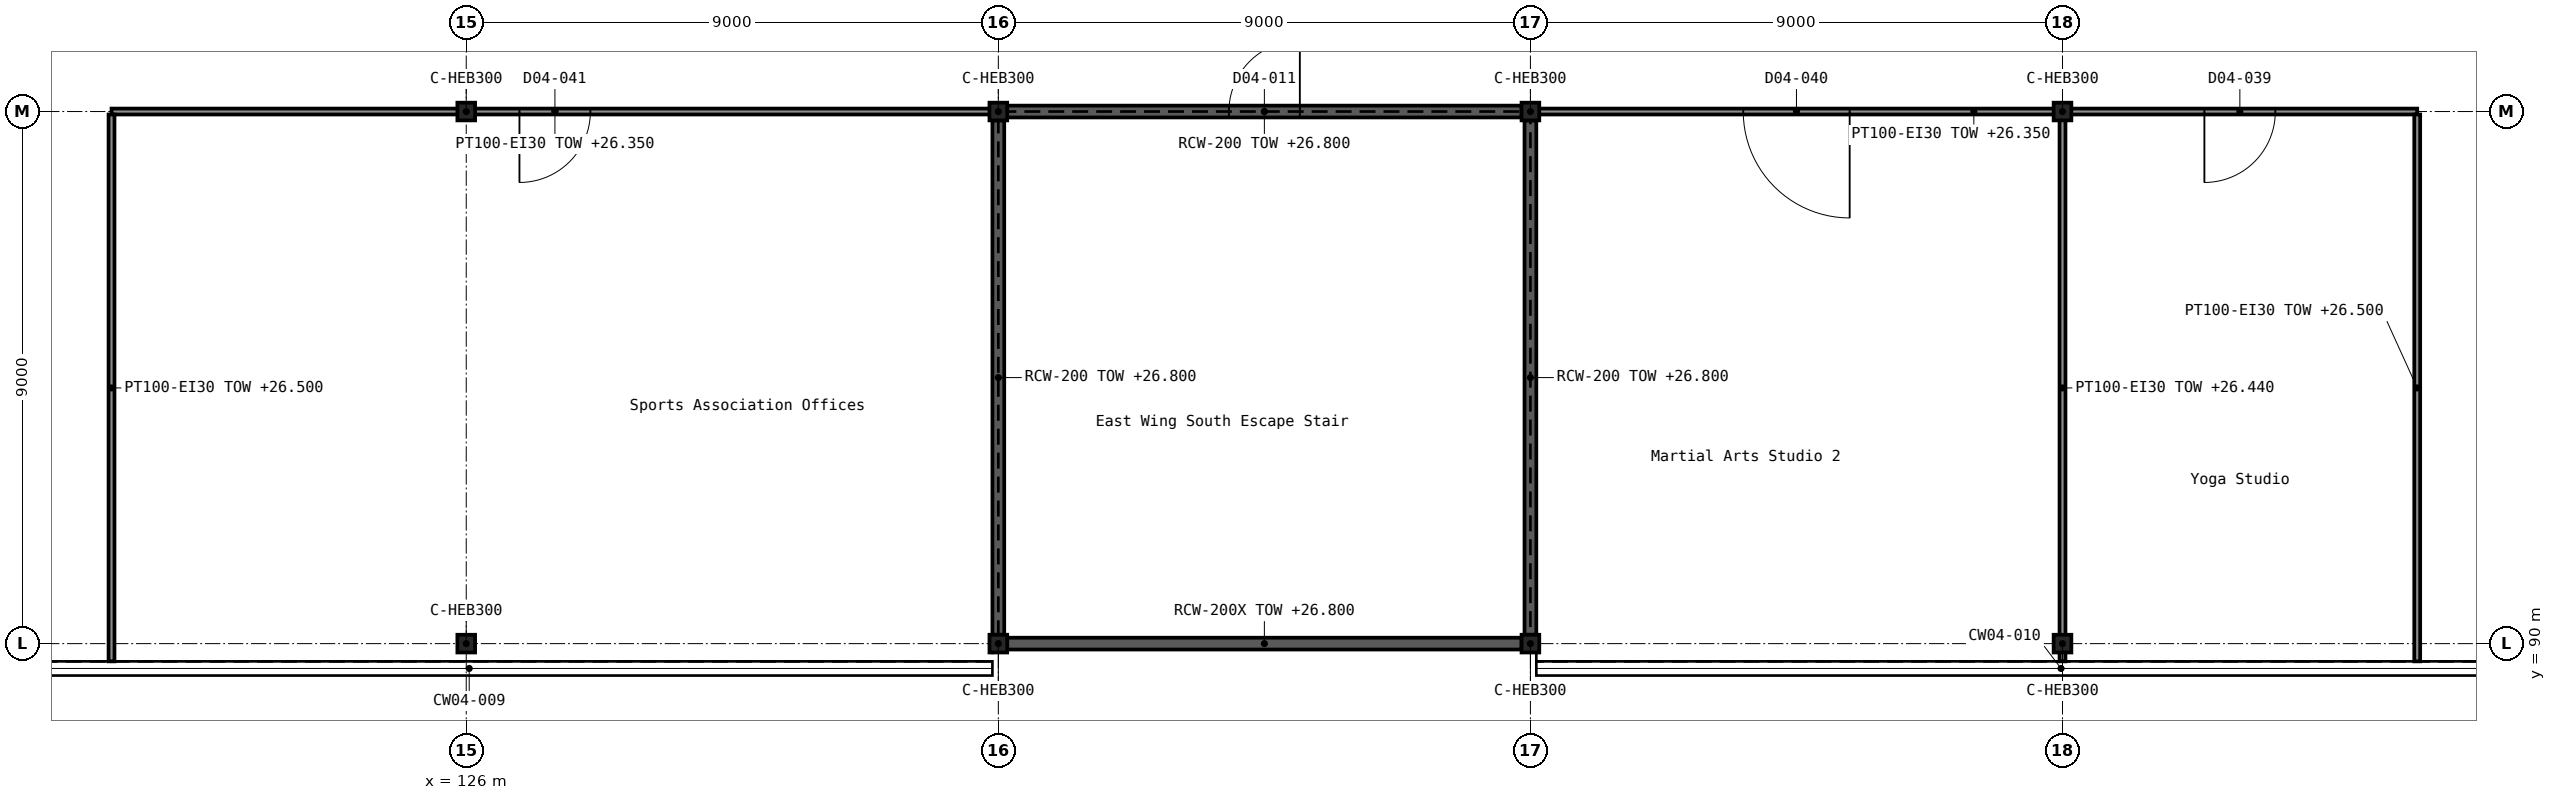
"""IFC4 building model, lengths in metres.
Left out: names, types, materials, properties, quantities, classifications, styles, units other than length and angle.
Written with IfcOpenShell. Run it as: python <this file> out.ifc"""

import sys

from ifc_helpers import new_model, si_unit, direction, frame, frame_2d, origin, origin_2d, place, context, subcontext, project, spatial, rectangle, i_section, extrude, element, fill, save


model = new_model("IFC4")
c1 = context("Model", 3, precision=1e-05, world=origin(), true_north=direction((0.0, 1.0)))
c2 = subcontext(c1, "Body", "Model", "MODEL_VIEW")
j1 = project(units=[si_unit("LENGTHUNIT", "METRE"), si_unit("PLANEANGLEUNIT", "RADIAN")], contexts=[c1])
p1 = place(None, origin())
s1 = spatial("IfcSite", under=j1, at=p1, CompositionType="ELEMENT")
p2 = place(p1, origin())
s2 = spatial("IfcBuilding", under=s1, at=p2, CompositionType="ELEMENT")
p3 = place(p2, frame((0.0, 0.0, 21.6)))
s3 = spatial("IfcBuildingStorey", under=s2, at=p3, CompositionType="ELEMENT", Elevation=21.6)
for number, where, z_axis, x_axis in (
    (1, (126.0, 90.0, 0.0), (0.0, 0.0, 1.0), (1.0, 0.0, 0.0)),
    (2, (135.0, 90.0, 0.0), (0.0, 0.0, 1.0), (1.0, 0.0, 0.0)),
    (3, (144.0, 90.0, 0.0), (0.0, 0.0, 1.0), (1.0, 0.0, 0.0)),
    (4, (153.0, 90.0, 0.0), (0.0, 0.0, 1.0), (1.0, 0.0, 0.0)),
    (5, (126.0, 99.0, 0.0), (0.0, 0.0, 1.0), (1.0, 0.0, 0.0)),
    (6, (135.0, 99.0, 0.0), (0.0, 0.0, 1.0), (1.0, 0.0, 0.0)),
    (7, (144.0, 99.0, 0.0), (0.0, 0.0, 1.0), (1.0, 0.0, 0.0)),
    (8, (153.0, 99.0, 0.0), (0.0, 0.0, 1.0), (1.0, 0.0, 0.0)),
):
    element("IfcColumn", number, at=place(p3, frame(where, z_axis=z_axis, x_axis=x_axis)), inside=s3, PredefinedType="COLUMN", context=c2, shape_type="SweptSolid", body=[
        extrude(i_section(OverallWidth=0.3, OverallDepth=0.3, WebThickness=0.011, FlangeThickness=0.019, FilletRadius=0.027, at=origin_2d()), origin(), (0.0, 0.0, 1.0), 5.4),
    ])
p4 = place(p3, frame((135.15, 90.0, 0.0), z_axis=(0.0, 0.0, 1.0), x_axis=(1.0, 0.0, 0.0)))
e9 = element("IfcWall", 9, at=p4, inside=s3, PredefinedType="SHEAR", context=c2, shape_type="SweptSolid", body=[
    extrude(rectangle(XDim=8.7, YDim=0.2, at=frame_2d((4.35, 0.0))), origin(), (0.0, 0.0, 1.0), 5.2),
])
p5 = place(p3, frame((135.15, 99.0, 0.0), z_axis=(0.0, 0.0, 1.0), x_axis=(1.0, 0.0, 0.0)))
e10 = element("IfcWall", 10, at=p5, inside=s3, PredefinedType="SHEAR", context=c2, shape_type="SweptSolid", body=[
    extrude(rectangle(XDim=8.7, YDim=0.2, at=frame_2d((4.35, 0.0))), origin(), (0.0, 0.0, 1.0), 5.2),
])
p6 = place(p5, frame((3.75, 0.0, 0.0)))
e11 = element("IfcOpeningElement", 11, at=p6, cuts=e10, PredefinedType="OPENING", context=c2, shape_type="SweptSolid", body=[
    extrude(rectangle(XDim=1.2, YDim=2.1, at=frame_2d((0.6, 1.05))), frame((0.0, 0.111, 0.0), z_axis=(0.0, -1.0, 0.0), x_axis=(1.0, 0.0, 0.0)), (0.0, 0.0, 1.0), 0.222),
])
for number, where, z_axis, x_axis in (
    (12, (135.0, 90.15, 0.0), (0.0, 0.0, 1.0), (0.0, 1.0, 0.0)),
    (13, (144.0, 90.15, 0.0), (0.0, 0.0, 1.0), (0.0, 1.0, 0.0)),
):
    element("IfcWall", number, at=place(p3, frame(where, z_axis=z_axis, x_axis=x_axis)), inside=s3, PredefinedType="SHEAR", context=c2, shape_type="SweptSolid", body=[
        extrude(rectangle(XDim=8.7, YDim=0.2, at=frame_2d((4.35, 0.0))), origin(), (0.0, 0.0, 1.0), 5.2),
    ])
p7 = place(p3, frame((120.0, 99.0, 0.0), z_axis=(0.0, 0.0, 1.0), x_axis=(1.0, 0.0, 0.0)))
e14 = element("IfcWall", 14, at=p7, inside=s3, PredefinedType="PARTITIONING", context=c2, shape_type="SweptSolid", body=[
    extrude(rectangle(XDim=15.0, YDim=0.1, at=frame_2d((7.5, 0.0))), origin(), (0.0, 0.0, 1.0), 4.75),
])
p8 = place(p7, frame((6.9, 0.0, 0.0)))
e15 = element("IfcOpeningElement", 15, at=p8, cuts=e14, PredefinedType="OPENING", context=c2, shape_type="SweptSolid", body=[
    extrude(rectangle(XDim=1.2, YDim=2.1, at=frame_2d((0.6, 1.05))), frame((0.0, 0.061, 0.0), z_axis=(0.0, -1.0, 0.0), x_axis=(1.0, 0.0, 0.0)), (0.0, 0.0, 1.0), 0.122),
])
p9 = place(p3, frame((144.0, 99.0, 0.0), z_axis=(0.0, 0.0, 1.0), x_axis=(1.0, 0.0, 0.0)))
e16 = element("IfcWall", 16, at=p9, inside=s3, PredefinedType="PARTITIONING", context=c2, shape_type="SweptSolid", body=[
    extrude(rectangle(XDim=15.0, YDim=0.1, at=frame_2d((7.5, 0.0))), origin(), (0.0, 0.0, 1.0), 4.75),
])
p10 = place(p9, frame((11.4, 0.0, 0.0)))
e17 = element("IfcOpeningElement", 17, at=p10, cuts=e16, PredefinedType="OPENING", context=c2, shape_type="SweptSolid", body=[
    extrude(rectangle(XDim=1.2, YDim=2.1, at=frame_2d((0.6, 1.05))), frame((0.0, 0.061, 0.0), z_axis=(0.0, -1.0, 0.0), x_axis=(1.0, 0.0, 0.0)), (0.0, 0.0, 1.0), 0.122),
])
p11 = place(p9, frame((3.6, 0.0, 0.0)))
e18 = element("IfcOpeningElement", 18, at=p11, cuts=e16, PredefinedType="OPENING", context=c2, shape_type="SweptSolid", body=[
    extrude(rectangle(XDim=1.8, YDim=2.1, at=frame_2d((0.9, 1.05))), frame((0.0, 0.061, 0.0), z_axis=(0.0, -1.0, 0.0), x_axis=(1.0, 0.0, 0.0)), (0.0, 0.0, 1.0), 0.122),
])
p12 = place(p3, frame((120.0, 89.7, 0.0), z_axis=(0.0, 0.0, 1.0), x_axis=(0.0, 1.0, 0.0)))
e19 = element("IfcWall", 19, at=p12, inside=s3, PredefinedType="PARTITIONING", context=c2, shape_type="SweptSolid", body=[
    extrude(rectangle(XDim=9.25, YDim=0.1, at=frame_2d((4.625, 0.0))), origin(), (0.0, 0.0, 1.0), 4.9),
])
p13 = place(p3, frame((153.0, 89.7, 0.0), z_axis=(0.0, 0.0, 1.0), x_axis=(0.0, 1.0, 0.0)))
e20 = element("IfcWall", 20, at=p13, inside=s3, PredefinedType="PARTITIONING", context=c2, shape_type="SweptSolid", body=[
    extrude(rectangle(XDim=9.25, YDim=0.1, at=frame_2d((4.625, 0.0))), origin(), (0.0, 0.0, 1.0), 4.84),
])
p14 = place(p3, frame((159.0, 89.7, 0.0), z_axis=(0.0, 0.0, 1.0), x_axis=(0.0, 1.0, 0.0)))
e21 = element("IfcWall", 21, at=p14, inside=s3, PredefinedType="PARTITIONING", context=c2, shape_type="SweptSolid", body=[
    extrude(rectangle(XDim=9.25, YDim=0.1, at=frame_2d((4.625, 0.0))), origin(), (0.0, 0.0, 1.0), 4.9),
])
p15 = place(p6, origin())
e22 = element("IfcDoor", 22, at=p15, inside=s3, OperationType="SINGLE_SWING_RIGHT", PredefinedType="DOOR", context=c2, shape_type="SweptSolid", body=[
    extrude(rectangle(XDim=1.2, YDim=2.1, at=frame_2d((0.6, 1.05))), frame((0.0, 0.025, 0.0), z_axis=(0.0, -1.0, 0.0), x_axis=(1.0, 0.0, 0.0)), (0.0, 0.0, 1.0), 0.05),
])
fill(e11, e22)
p16 = place(p10, frame((1.2, 0.0, 0.0), z_axis=(0.0, 0.0, 1.0), x_axis=(-1.0, 0.0, 0.0)))
e23 = element("IfcDoor", 23, at=p16, inside=s3, OperationType="SINGLE_SWING_RIGHT", PredefinedType="DOOR", context=c2, shape_type="SweptSolid", body=[
    extrude(rectangle(XDim=1.2, YDim=2.1, at=frame_2d((0.6, 1.05))), frame((0.0, 0.025, 0.0), z_axis=(0.0, -1.0, 0.0), x_axis=(1.0, 0.0, 0.0)), (0.0, 0.0, 1.0), 0.05),
])
fill(e17, e23)
p17 = place(p11, frame((1.8, 0.0, 0.0), z_axis=(0.0, 0.0, 1.0), x_axis=(-1.0, 0.0, 0.0)))
e24 = element("IfcDoor", 24, at=p17, inside=s3, OperationType="DOUBLE_DOOR_SINGLE_SWING", PredefinedType="DOOR", context=c2, shape_type="SweptSolid", body=[
    extrude(rectangle(XDim=1.8, YDim=2.1, at=frame_2d((0.9, 1.05))), frame((0.0, 0.025, 0.0), z_axis=(0.0, -1.0, 0.0), x_axis=(1.0, 0.0, 0.0)), (0.0, 0.0, 1.0), 0.05),
])
fill(e18, e24)
p18 = place(p8, frame((1.2, 0.0, 0.0), z_axis=(0.0, 0.0, 1.0), x_axis=(-1.0, 0.0, 0.0)))
e25 = element("IfcDoor", 25, at=p18, inside=s3, OperationType="SINGLE_SWING_RIGHT", PredefinedType="DOOR", context=c2, shape_type="SweptSolid", body=[
    extrude(rectangle(XDim=1.2, YDim=2.1, at=frame_2d((0.6, 1.05))), frame((0.0, 0.025, 0.0), z_axis=(0.0, -1.0, 0.0), x_axis=(1.0, 0.0, 0.0)), (0.0, 0.0, 1.0), 0.05),
])
fill(e15, e25)
save(model, sys.argv[1])
